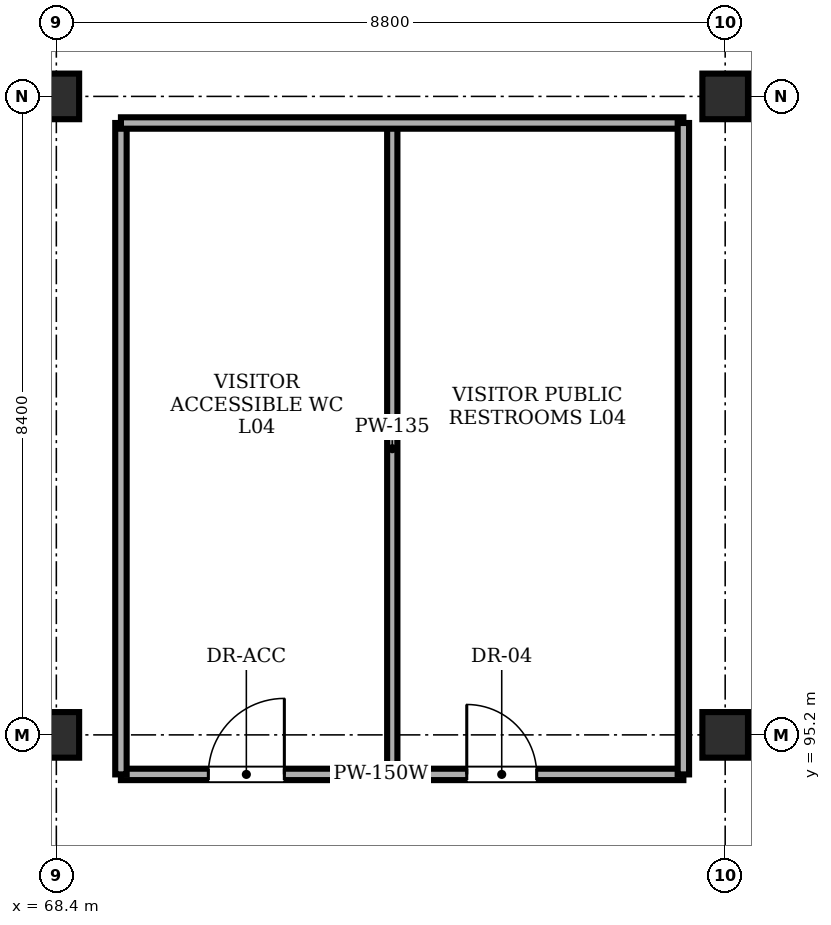
"""IFC4 building model, lengths in metres.
Left out: names, types, materials, properties, quantities, classifications, styles, units other than length and angle.
Written with IfcOpenShell. Run it as: python <this file> out.ifc"""

import sys

from ifc_helpers import new_model, si_unit, direction, frame, frame_2d, origin, origin_2d, place, context, subcontext, project, spatial, rectangle, extrude, element, fill, save


model = new_model("IFC4")
c1 = context("Model", 3, precision=1e-05, world=origin(), true_north=direction((0.0, 1.0)))
c2 = subcontext(c1, "Body", "Model", "MODEL_VIEW")
j1 = project(units=[si_unit("LENGTHUNIT", "METRE"), si_unit("PLANEANGLEUNIT", "RADIAN")], contexts=[c1])
p1 = place(None, origin())
s1 = spatial("IfcSite", under=j1, at=p1, CompositionType="ELEMENT")
p2 = place(p1, origin())
s2 = spatial("IfcBuilding", under=s1, at=p2, CompositionType="ELEMENT")
p3 = place(p2, frame((0.0, 0.0, 14.7)))
s3 = spatial("IfcBuildingStorey", under=s2, at=p3, CompositionType="ELEMENT", Elevation=14.7)
for number, where, z_axis, x_axis in (
    (1, (68.4, 95.2, 0.0), (0.0, 0.0, 1.0), (1.0, 0.0, 0.0)),
    (2, (68.4, 103.6, 0.0), (0.0, 0.0, 1.0), (1.0, 0.0, 0.0)),
    (3, (77.2, 95.2, 0.0), (0.0, 0.0, 1.0), (1.0, 0.0, 0.0)),
    (4, (77.2, 103.6, 0.0), (0.0, 0.0, 1.0), (1.0, 0.0, 0.0)),
):
    element("IfcColumn", number, at=place(p3, frame(where, z_axis=z_axis, x_axis=x_axis)), inside=s3, PredefinedType="COLUMN", context=c2, shape_type="SweptSolid", body=[
        extrude(rectangle(XDim=0.6, YDim=0.6, at=origin_2d()), origin(), (0.0, 0.0, 1.0), 4.5),
    ])
p4 = place(p3, frame((69.25, 94.68, 0.0), z_axis=(0.0, 0.0, 1.0), x_axis=(1.0, 0.0, 0.0)))
e5 = element("IfcWall", 5, at=p4, inside=s3, PredefinedType="PARTITIONING", context=c2, shape_type="SweptSolid", body=[
    extrude(rectangle(XDim=7.4, YDim=0.15, at=frame_2d((3.7, 0.0))), origin(), (0.0, 0.0, 1.0), 4.25),
])
p5 = place(p4, frame((1.15, 0.0, 0.0)))
e6 = element("IfcOpeningElement", 6, at=p5, cuts=e5, PredefinedType="OPENING", context=c2, shape_type="SweptSolid", body=[
    extrude(rectangle(XDim=1.0, YDim=2.12, at=frame_2d((0.5, 1.06))), frame((0.0, 0.085, 0.0), z_axis=(0.0, -1.0, 0.0), x_axis=(1.0, 0.0, 0.0)), (0.0, 0.0, 1.0), 0.17),
])
p6 = place(p4, frame((4.55, 0.0, 0.0)))
e7 = element("IfcOpeningElement", 7, at=p6, cuts=e5, PredefinedType="OPENING", context=c2, shape_type="SweptSolid", body=[
    extrude(rectangle(XDim=0.92, YDim=2.1, at=frame_2d((0.46, 1.05))), frame((0.0, 0.085, 0.0), z_axis=(0.0, -1.0, 0.0), x_axis=(1.0, 0.0, 0.0)), (0.0, 0.0, 1.0), 0.17),
])
p7 = place(p3, frame((69.25, 94.68, 0.0), z_axis=(0.0, 0.0, 1.0), x_axis=(0.0, 1.0, 0.0)))
e8 = element("IfcWall", 8, at=p7, inside=s3, PredefinedType="PARTITIONING", context=c2, shape_type="SweptSolid", body=[
    extrude(rectangle(XDim=8.57, YDim=0.15, at=frame_2d((4.285, 0.0))), origin(), (0.0, 0.0, 1.0), 4.25),
])
p8 = place(p3, frame((72.82, 94.68, 0.0), z_axis=(0.0, 0.0, 1.0), x_axis=(0.0, 1.0, 0.0)))
e9 = element("IfcWall", 9, at=p8, inside=s3, PredefinedType="PARTITIONING", context=c2, shape_type="SweptSolid", body=[
    extrude(rectangle(XDim=8.57, YDim=0.135, at=frame_2d((4.285, 0.0))), origin(), (0.0, 0.0, 1.0), 4.25),
])
p9 = place(p3, frame((69.25, 103.25, 0.0), z_axis=(0.0, 0.0, 1.0), x_axis=(1.0, 0.0, 0.0)))
e10 = element("IfcWall", 10, at=p9, inside=s3, PredefinedType="PARTITIONING", context=c2, shape_type="SweptSolid", body=[
    extrude(rectangle(XDim=7.4, YDim=0.15, at=frame_2d((3.7, 0.0))), origin(), (0.0, 0.0, 1.0), 4.25),
])
p10 = place(p3, frame((76.65, 94.68, 0.0), z_axis=(0.0, 0.0, 1.0), x_axis=(0.0, 1.0, 0.0)))
e11 = element("IfcWall", 11, at=p10, inside=s3, PredefinedType="PARTITIONING", context=c2, shape_type="SweptSolid", body=[
    extrude(rectangle(XDim=8.57, YDim=0.15, at=frame_2d((4.285, 0.0))), origin(), (0.0, 0.0, 1.0), 4.25),
])
p11 = place(p5, origin())
e12 = element("IfcDoor", 12, at=p11, inside=s3, OperationType="SINGLE_SWING_RIGHT", PredefinedType="DOOR", context=c2, shape_type="SweptSolid", body=[
    extrude(rectangle(XDim=1.0, YDim=2.12, at=frame_2d((0.5, 1.06))), frame((0.0, 0.025, 0.0), z_axis=(0.0, -1.0, 0.0), x_axis=(1.0, 0.0, 0.0)), (0.0, 0.0, 1.0), 0.05),
])
fill(e6, e12)
p12 = place(p6, origin())
e13 = element("IfcDoor", 13, at=p12, inside=s3, OperationType="SINGLE_SWING_LEFT", PredefinedType="DOOR", context=c2, shape_type="SweptSolid", body=[
    extrude(rectangle(XDim=0.92, YDim=2.1, at=frame_2d((0.46, 1.05))), frame((0.0, 0.025, 0.0), z_axis=(0.0, -1.0, 0.0), x_axis=(1.0, 0.0, 0.0)), (0.0, 0.0, 1.0), 0.05),
])
fill(e7, e13)
save(model, sys.argv[1])
